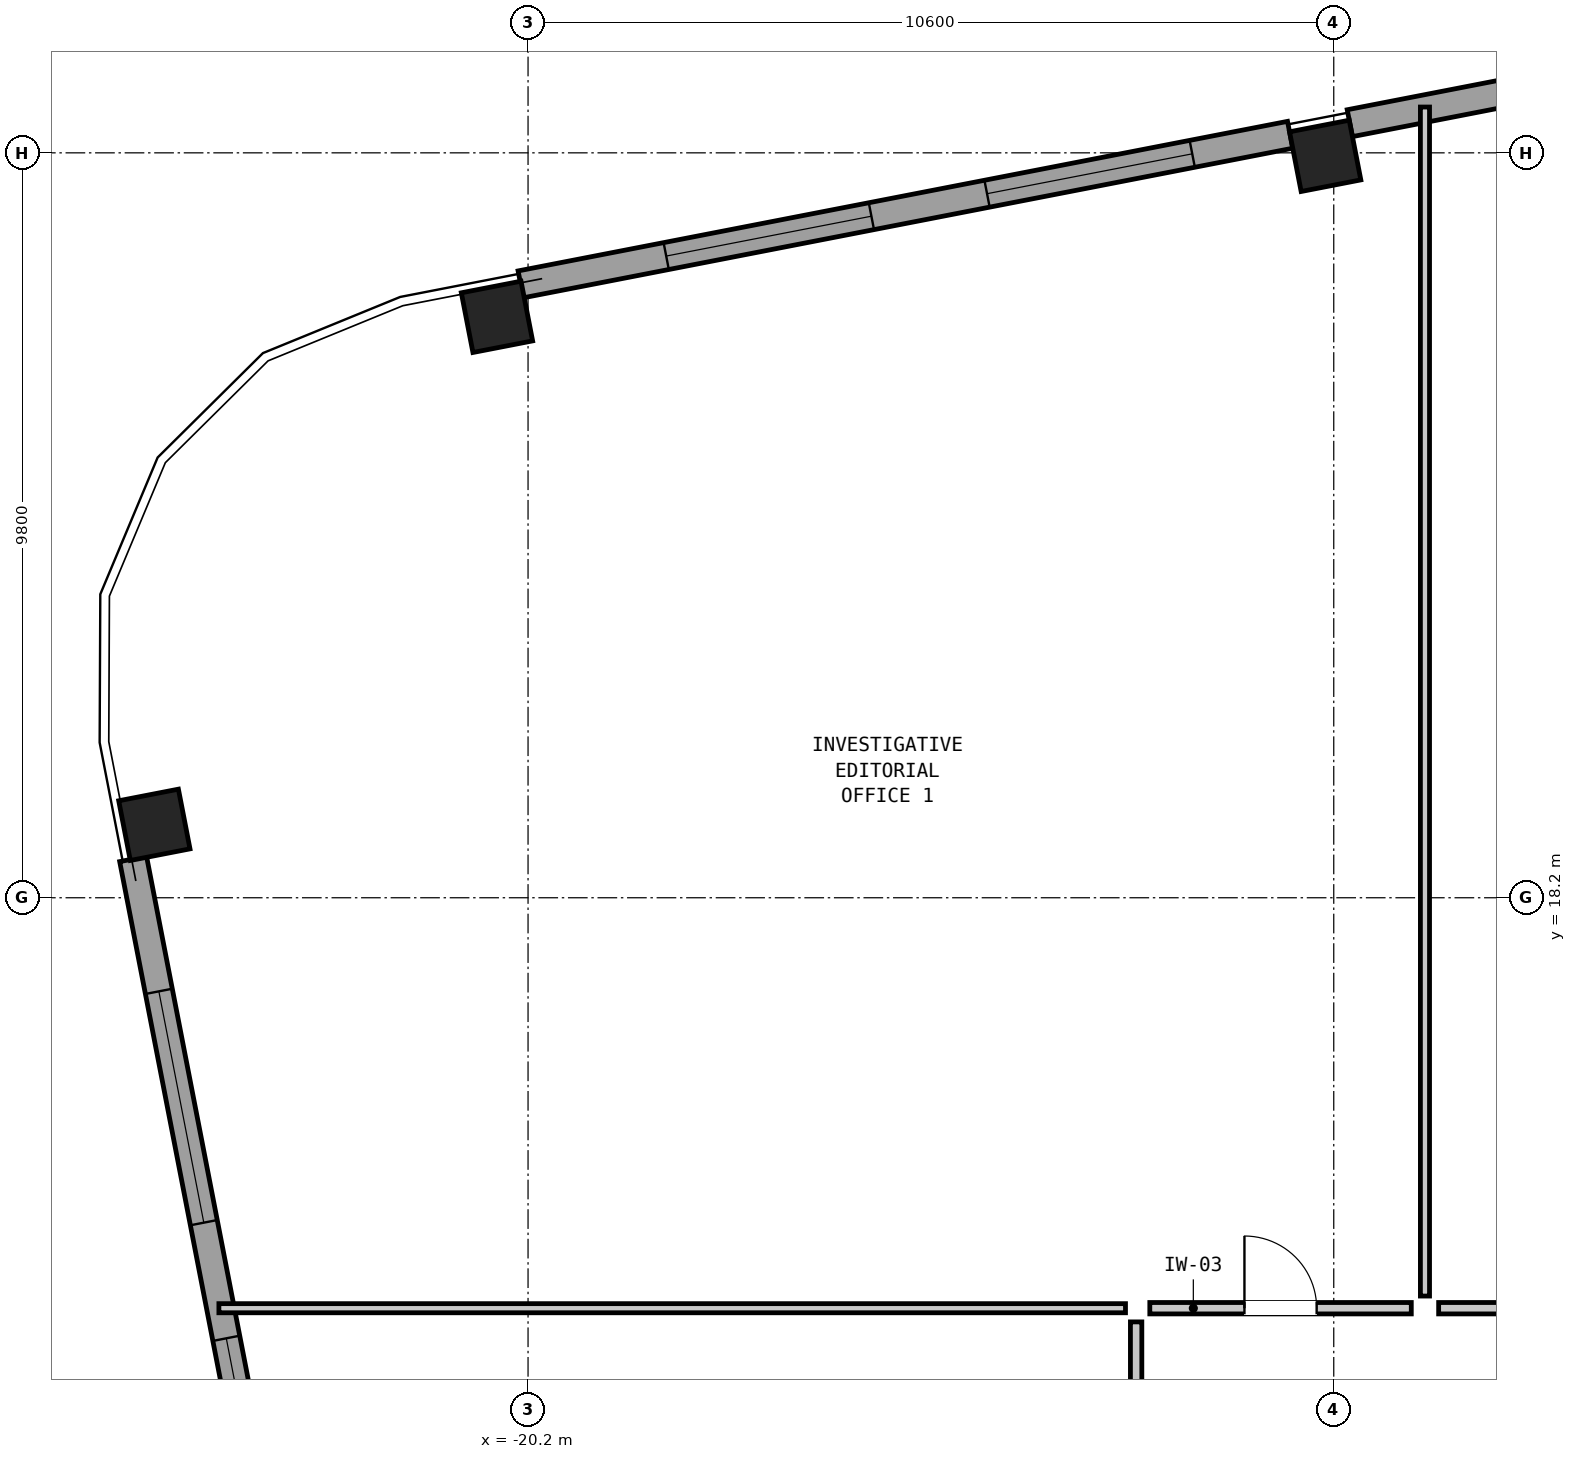
"""IFC4 building model, lengths in metres.
Left out: names, types, materials, properties, quantities, classifications, styles, units other than length and angle.
Written with IfcOpenShell. Run it as: python <this file> out.ifc"""

import sys

from ifc_helpers import new_model, si_unit, direction, frame, frame_2d, origin, origin_2d, place, context, subcontext, project, spatial, rectangle, hollow_rectangle, extrude, element, fill, save


model = new_model("IFC4")
c1 = context("Model", 3, precision=1e-05, world=origin(), true_north=direction((0.0, 1.0)))
c2 = subcontext(c1, "Body", "Model", "MODEL_VIEW")
j1 = project(units=[si_unit("LENGTHUNIT", "METRE"), si_unit("PLANEANGLEUNIT", "RADIAN")], contexts=[c1])
p1 = place(None, origin())
s1 = spatial("IfcSite", under=j1, at=p1, CompositionType="ELEMENT")
p2 = place(p1, origin())
s2 = spatial("IfcBuilding", under=s1, at=p2, CompositionType="ELEMENT")
p3 = place(p2, frame((0.0, 0.0, 121.95)))
s3 = spatial("IfcBuildingStorey", under=s2, at=p3, CompositionType="ELEMENT", Elevation=121.95)
for number, where, z_axis, x_axis in (
    (1, (-9.713, 27.96, 0.0), (0.0, 0.0, 1.0), (0.982, 0.191, 0.0)),
    (2, (-20.609, 25.842, 0.0), (0.0, 0.0, 1.0), (0.982, 0.191, 0.0)),
    (3, (-25.116, 19.159, 0.0), (0.0, 0.0, 1.0), (-0.191, 0.982, 0.0)),
):
    element("IfcColumn", number, at=place(p3, frame(where, z_axis=z_axis, x_axis=x_axis)), inside=s3, PredefinedType="COLUMN", context=c2, shape_type="SweptSolid", body=[
        extrude(hollow_rectangle(XDim=0.8, YDim=0.8, WallThickness=0.05, at=origin_2d()), origin(), (0.0, 0.0, 1.0), 3.05),
    ])
p4 = place(p3, frame((-20.296, 26.27, 0.0), z_axis=(0.0, 0.0, 1.0), x_axis=(0.981628941133, 0.190799952646, 0.0)))
e4 = element("IfcWall", 4, at=p4, inside=s3, PredefinedType="SOLIDWALL", context=c2, shape_type="SweptSolid", body=[
    extrude(rectangle(XDim=10.312, YDim=0.36, at=frame_2d((5.156, 0.0))), origin(), (0.0, 0.0, 1.0), 2.067),
])
p5 = place(p4, frame((1.95, 0.0, 0.2)))
e5 = element("IfcOpeningElement", 5, at=p5, cuts=e4, PredefinedType="OPENING", context=c2, shape_type="SweptSolid", body=[
    extrude(rectangle(XDim=2.75, YDim=0.95, at=frame_2d((1.375, 0.475))), frame((0.0, 0.192, 0.0), z_axis=(0.0, -1.0, 0.0), x_axis=(1.0, 0.0, 0.0)), (0.0, 0.0, 1.0), 0.384),
])
p6 = place(p4, frame((6.25, 0.0, 0.95)))
e6 = element("IfcOpeningElement", 6, at=p6, cuts=e4, PredefinedType="OPENING", context=c2, shape_type="SweptSolid", body=[
    extrude(rectangle(XDim=2.75, YDim=0.95, at=frame_2d((1.375, 0.475))), frame((0.0, 0.192, 0.0), z_axis=(0.0, -1.0, 0.0), x_axis=(1.0, 0.0, 0.0)), (0.0, 0.0, 1.0), 0.384),
])
p7 = place(p3, frame((-9.389, 28.39, 0.0), z_axis=(0.0, 0.0, 1.0), x_axis=(0.981627477005, 0.190807485147, 0.0)))
e7 = element("IfcWall", 7, at=p7, inside=s3, PredefinedType="SOLIDWALL", context=c2, shape_type="SweptSolid", body=[
    extrude(rectangle(XDim=10.3, YDim=0.36, at=frame_2d((5.15, 0.0))), origin(), (0.0, 0.0, 1.0), 2.067),
])
p8 = place(p7, frame((3.988, 0.0, 0.8)))
e8 = element("IfcOpeningElement", 8, at=p8, cuts=e7, PredefinedType="OPENING", context=c2, shape_type="SweptSolid", body=[
    extrude(rectangle(XDim=2.3, YDim=1.1, at=frame_2d((1.15, 0.55))), frame((0.0, 0.192, 0.0), z_axis=(0.0, -1.0, 0.0), x_axis=(1.0, 0.0, 0.0)), (0.0, 0.0, 1.0), 0.384),
])
p9 = place(p7, frame((8.238, 0.0, 0.2)))
e9 = element("IfcOpeningElement", 9, at=p9, cuts=e7, PredefinedType="OPENING", context=c2, shape_type="SweptSolid", body=[
    extrude(rectangle(XDim=2.0, YDim=1.05, at=frame_2d((1.0, 0.525))), frame((0.0, 0.192, 0.0), z_axis=(0.0, -1.0, 0.0), x_axis=(1.0, 0.0, 0.0)), (0.0, 0.0, 1.0), 0.384),
])
p10 = place(p3, frame((-23.428, 8.587, 0.0), z_axis=(0.0, 0.0, 1.0), x_axis=(-0.190822765986, 0.981624506612, 0.0)))
e10 = element("IfcWall", 10, at=p10, inside=s3, PredefinedType="SOLIDWALL", context=c2, shape_type="SweptSolid", body=[
    extrude(rectangle(XDim=10.312, YDim=0.36, at=frame_2d((5.156, 0.0))), origin(), (0.0, 0.0, 1.0), 2.067),
])
p11 = place(p10, frame((1.438, 0.0, 0.8)))
e11 = element("IfcOpeningElement", 11, at=p11, cuts=e10, PredefinedType="OPENING", context=c2, shape_type="SweptSolid", body=[
    extrude(rectangle(XDim=2.45, YDim=1.1, at=frame_2d((1.225, 0.55))), frame((0.0, 0.192, 0.0), z_axis=(0.0, -1.0, 0.0), x_axis=(1.0, 0.0, 0.0)), (0.0, 0.0, 1.0), 0.384),
])
p12 = place(p10, frame((5.438, 0.0, 0.2)))
e12 = element("IfcOpeningElement", 12, at=p12, cuts=e10, PredefinedType="OPENING", context=c2, shape_type="SweptSolid", body=[
    extrude(rectangle(XDim=3.1, YDim=0.9, at=frame_2d((1.55, 0.45))), frame((0.0, 0.192, 0.0), z_axis=(0.0, -1.0, 0.0), x_axis=(1.0, 0.0, 0.0)), (0.0, 0.0, 1.0), 0.384),
])
p13 = place(p3, frame((-24.267, 12.8, 0.0), z_axis=(0.0, 0.0, 1.0), x_axis=(1.0, 0.0, 0.0)))
e13 = element("IfcWall", 13, at=p13, inside=s3, PredefinedType="PARTITIONING", context=c2, shape_type="SweptSolid", body=[
    extrude(rectangle(XDim=11.927, YDim=0.12, at=frame_2d((5.964, 0.0))), origin(), (0.0, 0.0, 1.0), 2.83),
])
p14 = place(p3, frame((-8.4, 12.96, 0.0), z_axis=(0.0, 0.0, 1.0), x_axis=(0.0, 1.0, 0.0)))
e14 = element("IfcWall", 14, at=p14, inside=s3, PredefinedType="PARTITIONING", context=c2, shape_type="SweptSolid", body=[
    extrude(rectangle(XDim=15.643, YDim=0.12, at=frame_2d((7.821, 0.0))), origin(), (0.0, 0.0, 1.0), 2.83),
])
p15 = place(p3, frame((-12.02, 12.8, 0.0), z_axis=(0.0, 0.0, 1.0), x_axis=(1.0, 0.0, 0.0)))
e15 = element("IfcWall", 15, at=p15, inside=s3, PredefinedType="PARTITIONING", context=c2, shape_type="SweptSolid", body=[
    extrude(rectangle(XDim=3.44, YDim=0.15, at=frame_2d((1.72, 0.0))), origin(), (0.0, 0.0, 1.0), 2.83),
])
p16 = place(p15, frame((1.245, 0.0, 0.0)))
e16 = element("IfcOpeningElement", 16, at=p16, cuts=e15, PredefinedType="OPENING", context=c2, shape_type="SweptSolid", body=[
    extrude(rectangle(XDim=0.95, YDim=2.1, at=frame_2d((0.475, 1.05))), frame((0.0, 0.087, 0.0), z_axis=(0.0, -1.0, 0.0), x_axis=(1.0, 0.0, 0.0)), (0.0, 0.0, 1.0), 0.174),
])
p17 = place(p3, frame((-8.22, 12.8, 0.0), z_axis=(0.0, 0.0, 1.0), x_axis=(1.0, 0.0, 0.0)))
e17 = element("IfcWall", 17, at=p17, inside=s3, PredefinedType="PARTITIONING", context=c2, shape_type="SweptSolid", body=[
    extrude(rectangle(XDim=5.24, YDim=0.15, at=frame_2d((2.62, 0.0))), origin(), (0.0, 0.0, 1.0), 2.83),
])
p18 = place(p17, frame((2.145, 0.0, 0.0)))
e18 = element("IfcOpeningElement", 18, at=p18, cuts=e17, PredefinedType="OPENING", context=c2, shape_type="SweptSolid", body=[
    extrude(rectangle(XDim=0.95, YDim=2.1, at=frame_2d((0.475, 1.05))), frame((0.0, 0.087, 0.0), z_axis=(0.0, -1.0, 0.0), x_axis=(1.0, 0.0, 0.0)), (0.0, 0.0, 1.0), 0.174),
])
p19 = place(p3, frame((-12.2, 0.18, 0.0), z_axis=(0.0, 0.0, 1.0), x_axis=(0.0, 1.0, 0.0)))
e19 = element("IfcWall", 19, at=p19, inside=s3, PredefinedType="PARTITIONING", context=c2, shape_type="SweptSolid", body=[
    extrude(rectangle(XDim=12.44, YDim=0.15, at=frame_2d((6.22, 0.0))), origin(), (0.0, 0.0, 1.0), 2.83),
])
p20 = place(p19, frame((5.745, 0.0, 0.0)))
e20 = element("IfcOpeningElement", 20, at=p20, cuts=e19, PredefinedType="OPENING", context=c2, shape_type="SweptSolid", body=[
    extrude(rectangle(XDim=0.95, YDim=2.1, at=frame_2d((0.475, 1.05))), frame((0.0, 0.087, 0.0), z_axis=(0.0, -1.0, 0.0), x_axis=(1.0, 0.0, 0.0)), (0.0, 0.0, 1.0), 0.174),
])
p21 = place(p5, origin())
e21 = element("IfcWindow", 21, at=p21, inside=s3, PartitioningType="SINGLE_PANEL", PredefinedType="WINDOW", context=c2, shape_type="SweptSolid", body=[
    extrude(rectangle(XDim=2.75, YDim=0.95, at=frame_2d((1.375, 0.475))), frame((0.0, 0.03, 0.0), z_axis=(0.0, -1.0, 0.0), x_axis=(1.0, 0.0, 0.0)), (0.0, 0.0, 1.0), 0.06),
])
fill(e5, e21)
p22 = place(p6, origin())
e22 = element("IfcWindow", 22, at=p22, inside=s3, PartitioningType="SINGLE_PANEL", PredefinedType="WINDOW", context=c2, shape_type="SweptSolid", body=[
    extrude(rectangle(XDim=2.75, YDim=0.95, at=frame_2d((1.375, 0.475))), frame((0.0, 0.03, 0.0), z_axis=(0.0, -1.0, 0.0), x_axis=(1.0, 0.0, 0.0)), (0.0, 0.0, 1.0), 0.06),
])
fill(e6, e22)
p23 = place(p11, origin())
e23 = element("IfcWindow", 23, at=p23, inside=s3, PartitioningType="SINGLE_PANEL", PredefinedType="WINDOW", context=c2, shape_type="SweptSolid", body=[
    extrude(rectangle(XDim=2.45, YDim=1.1, at=frame_2d((1.225, 0.55))), frame((0.0, 0.03, 0.0), z_axis=(0.0, -1.0, 0.0), x_axis=(1.0, 0.0, 0.0)), (0.0, 0.0, 1.0), 0.06),
])
fill(e11, e23)
p24 = place(p12, origin())
e24 = element("IfcWindow", 24, at=p24, inside=s3, PartitioningType="SINGLE_PANEL", PredefinedType="WINDOW", context=c2, shape_type="SweptSolid", body=[
    extrude(rectangle(XDim=3.1, YDim=0.9, at=frame_2d((1.55, 0.45))), frame((0.0, 0.03, 0.0), z_axis=(0.0, -1.0, 0.0), x_axis=(1.0, 0.0, 0.0)), (0.0, 0.0, 1.0), 0.06),
])
fill(e12, e24)
p25 = place(p16, origin())
e25 = element("IfcDoor", 25, at=p25, inside=s3, OperationType="SINGLE_SWING_LEFT", PredefinedType="DOOR", context=c2, shape_type="SweptSolid", body=[
    extrude(rectangle(XDim=0.95, YDim=2.1, at=frame_2d((0.475, 1.05))), frame((0.0, 0.025, 0.0), z_axis=(0.0, -1.0, 0.0), x_axis=(1.0, 0.0, 0.0)), (0.0, 0.0, 1.0), 0.05),
])
fill(e16, e25)
save(model, sys.argv[1])
